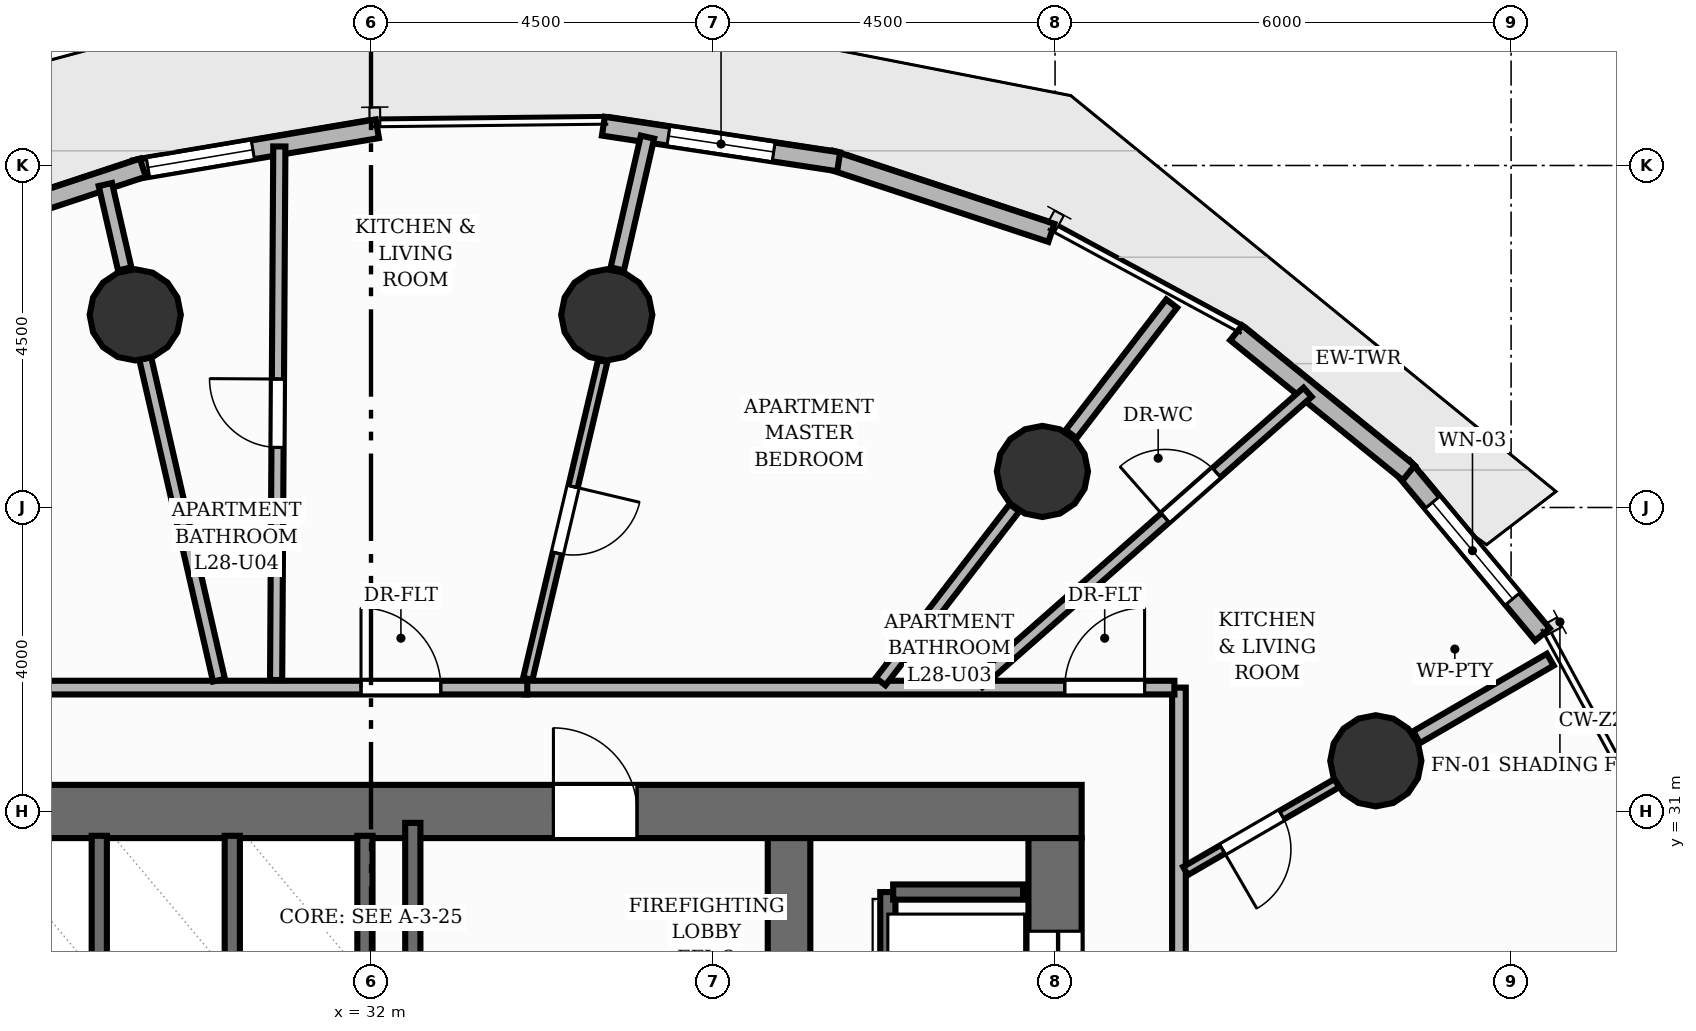
"""IFC4 building model, lengths in metres.
Left out: names, types, materials, properties, quantities, classifications, styles, units other than length and angle.
Written with IfcOpenShell. Run it as: python <this file> out.ifc"""

import sys

from ifc_helpers import new_model, si_unit, direction, frame, frame_2d, origin, origin_2d, place, context, subcontext, project, spatial, rectangle, circle, extrude, element, fill, save


model = new_model("IFC4")
c1 = context("Model", 3, precision=1e-05, world=origin(), true_north=direction((0.0, 1.0)))
c2 = subcontext(c1, "Body", "Model", "MODEL_VIEW")
j1 = project(units=[si_unit("LENGTHUNIT", "METRE"), si_unit("PLANEANGLEUNIT", "RADIAN")], contexts=[c1])
p1 = place(None, origin())
s1 = spatial("IfcSite", under=j1, at=p1, CompositionType="ELEMENT")
p2 = place(p1, origin())
s2 = spatial("IfcBuilding", under=s1, at=p2, CompositionType="ELEMENT")
p3 = place(p2, frame((0.0, 0.0, 96.48)))
s3 = spatial("IfcBuildingStorey", under=s2, at=p3, CompositionType="ELEMENT", Elevation=96.48)
p4 = place(p3, frame((22.65, 31.0, 0.0), z_axis=(0.0, 0.0, 1.0), x_axis=(1.0, 0.0, 0.0)))
e1 = element("IfcWall", 1, at=p4, inside=s3, PredefinedType="SHEAR", context=c2, shape_type="SweptSolid", body=[
    extrude(rectangle(XDim=18.7, YDim=0.7, at=frame_2d((9.35, 0.0))), origin(), (0.0, 0.0, 1.0), 3.2),
])
p5 = place(p4, frame((11.75, 0.0, 0.0)))
e2 = element("IfcOpeningElement", 2, at=p5, cuts=e1, PredefinedType="OPENING", context=c2, shape_type="SweptSolid", body=[
    extrude(rectangle(XDim=1.1, YDim=2.15, at=frame_2d((0.55, 1.075))), frame((0.0, 0.36, 0.0), z_axis=(0.0, -1.0, 0.0), x_axis=(1.0, 0.0, 0.0)), (0.0, 0.0, 1.0), 0.72),
])
p6 = place(p3, frame((41.0, 17.35, 0.0), z_axis=(0.0, 0.0, 1.0), x_axis=(0.0, 1.0, 0.0)))
e3 = element("IfcWall", 3, at=p6, inside=s3, PredefinedType="SHEAR", context=c2, shape_type="SweptSolid", body=[
    extrude(rectangle(XDim=13.3, YDim=0.7, at=frame_2d((6.65, 0.0))), origin(), (0.0, 0.0, 1.0), 3.2),
])
p7 = place(p6, frame((1.225, 0.0, 0.0)))
e4 = element("IfcOpeningElement", 4, at=p7, cuts=e3, PredefinedType="OPENING", context=c2, shape_type="SweptSolid", body=[
    extrude(rectangle(XDim=1.05, YDim=2.15, at=frame_2d((0.525, 1.075))), frame((0.0, 0.36, 0.0), z_axis=(0.0, -1.0, 0.0), x_axis=(1.0, 0.0, 0.0)), (0.0, 0.0, 1.0), 0.72),
])
p8 = place(p6, frame((4.475, 0.0, 0.0)))
e5 = element("IfcOpeningElement", 5, at=p8, cuts=e3, PredefinedType="OPENING", context=c2, shape_type="SweptSolid", body=[
    extrude(rectangle(XDim=1.05, YDim=2.15, at=frame_2d((0.525, 1.075))), frame((0.0, 0.36, 0.0), z_axis=(0.0, -1.0, 0.0), x_axis=(1.0, 0.0, 0.0)), (0.0, 0.0, 1.0), 0.72),
])
p9 = place(p6, frame((7.775, 0.0, 0.0)))
e6 = element("IfcOpeningElement", 6, at=p9, cuts=e3, PredefinedType="OPENING", context=c2, shape_type="SweptSolid", body=[
    extrude(rectangle(XDim=1.05, YDim=2.15, at=frame_2d((0.525, 1.075))), frame((0.0, 0.36, 0.0), z_axis=(0.0, -1.0, 0.0), x_axis=(1.0, 0.0, 0.0)), (0.0, 0.0, 1.0), 0.72),
])
p10 = place(p6, frame((11.025, 0.0, 0.0)))
e7 = element("IfcOpeningElement", 7, at=p10, cuts=e3, PredefinedType="OPENING", context=c2, shape_type="SweptSolid", body=[
    extrude(rectangle(XDim=1.05, YDim=2.15, at=frame_2d((0.525, 1.075))), frame((0.0, 0.36, 0.0), z_axis=(0.0, -1.0, 0.0), x_axis=(1.0, 0.0, 0.0)), (0.0, 0.0, 1.0), 0.72),
])
p11 = place(p3, frame((37.5, 17.35, 0.0), z_axis=(0.0, 0.0, 1.0), x_axis=(0.0, 1.0, 0.0)))
e8 = element("IfcWall", 8, at=p11, inside=s3, PredefinedType="SHEAR", context=c2, shape_type="SweptSolid", body=[
    extrude(rectangle(XDim=13.3, YDim=0.56, at=frame_2d((6.65, 0.0))), origin(), (0.0, 0.0, 1.0), 3.2),
])
for number, where, z_axis, x_axis in (
    (9, (45.22, 31.667, 0.0), (0.0, 0.0, 1.0), (1.0, 0.0, 0.0)),
    (10, (40.833, 35.474, 0.0), (0.0, 0.0, 1.0), (1.0, 0.0, 0.0)),
    (11, (35.102, 37.535, 0.0), (0.0, 0.0, 1.0), (1.0, 0.0, 0.0)),
    (12, (28.898, 37.535, 0.0), (0.0, 0.0, 1.0), (1.0, 0.0, 0.0)),
):
    element("IfcColumn", number, at=place(p3, frame(where, z_axis=z_axis, x_axis=x_axis)), inside=s3, PredefinedType="COLUMN", context=c2, shape_type="SweptSolid", body=[
        extrude(circle(Radius=0.6, at=origin_2d()), origin(), (0.0, 0.0, 1.0), 3.2),
    ])
p12 = place(p3, frame((45.572, 35.535, 0.0), z_axis=(0.0, 0.0, 1.0), x_axis=(0.640518566271, -0.76794268423, 0.0)))
e13 = element("IfcWall", 13, at=p12, inside=s3, PredefinedType="SOLIDWALL", context=c2, shape_type="SweptSolid", body=[
    extrude(rectangle(XDim=2.874, YDim=0.25, at=frame_2d((1.437, 0.0))), origin(), (0.0, 0.0, 1.0), 2.96),
])
p13 = place(p12, frame((0.612, 0.0, 0.85)))
e14 = element("IfcOpeningElement", 14, at=p13, cuts=e13, PredefinedType="OPENING", context=c2, shape_type="SweptSolid", body=[
    extrude(rectangle(XDim=1.65, YDim=1.55, at=frame_2d((0.825, 0.775))), frame((0.0, 0.135, 0.0), z_axis=(0.0, -1.0, 0.0), x_axis=(1.0, 0.0, 0.0)), (0.0, 0.0, 1.0), 0.27),
])
p14 = place(p3, frame((43.383, 37.298, 0.0), z_axis=(0.0, 0.0, 1.0), x_axis=(0.776285131062, -0.630381943976, 0.0)))
e15 = element("IfcWall", 15, at=p14, inside=s3, PredefinedType="SOLIDWALL", context=c2, shape_type="SweptSolid", body=[
    extrude(rectangle(XDim=2.923, YDim=0.25, at=frame_2d((1.462, 0.0))), origin(), (0.0, 0.0, 1.0), 2.96),
])
p15 = place(p3, frame((38.045, 39.574, 0.0), z_axis=(0.0, 0.0, 1.0), x_axis=(0.949533409058, -0.313665913166, 0.0)))
e16 = element("IfcWall", 16, at=p15, inside=s3, PredefinedType="SOLIDWALL", context=c2, shape_type="SweptSolid", body=[
    extrude(rectangle(XDim=3.061, YDim=0.25, at=frame_2d((1.53, 0.0))), origin(), (0.0, 0.0, 1.0), 2.96),
])
p16 = place(p3, frame((35.057, 40.017, 0.0), z_axis=(0.0, 0.0, 1.0), x_axis=(0.988719703222, -0.149777663425, 0.0)))
e17 = element("IfcWall", 17, at=p16, inside=s3, PredefinedType="SOLIDWALL", context=c2, shape_type="SweptSolid", body=[
    extrude(rectangle(XDim=3.131, YDim=0.25, at=frame_2d((1.566, 0.0))), origin(), (0.0, 0.0, 1.0), 2.96),
])
p17 = place(p16, frame((0.866, 0.0, 0.85)))
e18 = element("IfcOpeningElement", 18, at=p17, cuts=e17, PredefinedType="OPENING", context=c2, shape_type="SweptSolid", body=[
    extrude(rectangle(XDim=1.4, YDim=1.37, at=frame_2d((0.7, 0.685))), frame((0.0, 0.135, 0.0), z_axis=(0.0, -1.0, 0.0), x_axis=(1.0, 0.0, 0.0)), (0.0, 0.0, 1.0), 0.27),
])
p18 = place(p3, frame((28.893, 39.445, 0.0), z_axis=(0.0, 0.0, 1.0), x_axis=(0.986043062305, 0.166490478044, 0.0)))
e19 = element("IfcWall", 19, at=p18, inside=s3, PredefinedType="SOLIDWALL", context=c2, shape_type="SweptSolid", body=[
    extrude(rectangle(XDim=3.236, YDim=0.25, at=frame_2d((1.618, 0.0))), origin(), (0.0, 0.0, 1.0), 2.96),
])
p19 = place(p18, frame((0.175, 0.0, 0.85)))
e20 = element("IfcOpeningElement", 20, at=p19, cuts=e19, PredefinedType="OPENING", context=c2, shape_type="SweptSolid", body=[
    extrude(rectangle(XDim=1.4, YDim=1.55, at=frame_2d((0.7, 0.775))), frame((0.0, 0.135, 0.0), z_axis=(0.0, -1.0, 0.0), x_axis=(1.0, 0.0, 0.0)), (0.0, 0.0, 1.0), 0.27),
])
p20 = place(p3, frame((25.904, 38.445, 0.0), z_axis=(0.0, 0.0, 1.0), x_axis=(0.949206293356, 0.314654433709, 0.0)))
e21 = element("IfcWall", 21, at=p20, inside=s3, PredefinedType="SOLIDWALL", context=c2, shape_type="SweptSolid", body=[
    extrude(rectangle(XDim=3.26, YDim=0.25, at=frame_2d((1.63, 0.0))), origin(), (0.0, 0.0, 1.0), 2.96),
])
p21 = place(p3, frame((32.55, 27.35, 0.0), z_axis=(0.0, 0.0, 1.0), x_axis=(0.0, 1.0, 0.0)))
e22 = element("IfcWall", 22, at=p21, inside=s3, PredefinedType="SHEAR", context=c2, shape_type="SweptSolid", body=[
    extrude(rectangle(XDim=3.5, YDim=0.2, at=frame_2d((1.75, 0.0))), origin(), (0.0, 0.0, 1.0), 3.2),
])
p22 = place(p3, frame((38.8, 18.06, 0.0), z_axis=(0.0, 0.0, 1.0), x_axis=(0.0, 1.0, 0.0)))
e23 = element("IfcWall", 23, at=p22, inside=s3, PredefinedType="SHEAR", context=c2, shape_type="SweptSolid", body=[
    extrude(rectangle(XDim=11.88, YDim=0.2, at=frame_2d((5.94, 0.0))), origin(), (0.0, 0.0, 1.0), 3.2),
])
p23 = place(p3, frame((38.87, 29.94, 0.0), z_axis=(0.0, 0.0, 1.0), x_axis=(1.0, 0.0, 0.0)))
e24 = element("IfcWall", 24, at=p23, inside=s3, PredefinedType="SHEAR", context=c2, shape_type="SweptSolid", body=[
    extrude(rectangle(XDim=1.71, YDim=0.2, at=frame_2d((0.855, 0.0))), origin(), (0.0, 0.0, 1.0), 3.2),
])
for number, where, z_axis, x_axis in (
    (25, (31.92, 29.02, 0.0), (0.0, 0.0, 1.0), (0.0, 1.0, 0.0)),
    (26, (28.425, 29.02, 0.0), (0.0, 0.0, 1.0), (0.0, 1.0, 0.0)),
    (27, (30.175, 29.02, 0.0), (0.0, 0.0, 1.0), (0.0, 1.0, 0.0)),
):
    element("IfcWall", number, at=place(p3, frame(where, z_axis=z_axis, x_axis=x_axis)), inside=s3, PredefinedType="SHEAR", context=c2, shape_type="SweptSolid", body=[
        extrude(rectangle(XDim=1.66, YDim=0.2, at=frame_2d((0.83, 0.0))), origin(), (0.0, 0.0, 1.0), 3.2),
    ])
p24 = place(p3, frame((45.757, 31.978, 0.0), z_axis=(0.0, 0.0, 1.0), x_axis=(0.865025978628, 0.501727073516, 0.0)))
e28 = element("IfcWall", 28, at=p24, inside=s3, PredefinedType="PARTITIONING", context=c2, shape_type="SweptSolid", body=[
    extrude(rectangle(XDim=2.033, YDim=0.18, at=frame_2d((1.017, 0.0))), origin(), (0.0, 0.0, 1.0), 2.26),
])
p25 = place(p3, frame((41.212, 35.966, 0.0), z_axis=(0.0, 0.0, 1.0), x_axis=(0.610026423006, 0.792381071981, 0.0)))
e29 = element("IfcWall", 29, at=p25, inside=s3, PredefinedType="PARTITIONING", context=c2, shape_type="SweptSolid", body=[
    extrude(rectangle(XDim=2.167, YDim=0.18, at=frame_2d((1.084, 0.0))), origin(), (0.0, 0.0, 1.0), 2.26),
])
p26 = place(p3, frame((35.24, 38.139, 0.0), z_axis=(0.0, 0.0, 1.0), x_axis=(0.223406034992, 0.974725470853, 0.0)))
e30 = element("IfcWall", 30, at=p26, inside=s3, PredefinedType="PARTITIONING", context=c2, shape_type="SweptSolid", body=[
    extrude(rectangle(XDim=1.779, YDim=0.18, at=frame_2d((0.89, 0.0))), origin(), (0.0, 0.0, 1.0), 2.26),
])
p27 = place(p3, frame((28.76, 38.139, 0.0), z_axis=(0.0, 0.0, 1.0), x_axis=(-0.223325248633, 0.974743983476, 0.0)))
e31 = element("IfcWall", 31, at=p27, inside=s3, PredefinedType="PARTITIONING", context=c2, shape_type="SweptSolid", body=[
    extrude(rectangle(XDim=1.139, YDim=0.18, at=frame_2d((0.57, 0.0))), origin(), (0.0, 0.0, 1.0), 2.26),
])
p28 = place(p3, frame((42.63, 32.63, 0.0), z_axis=(0.0, 0.0, 1.0), x_axis=(0.0, -1.0, 0.0)))
e32 = element("IfcWall", 32, at=p28, inside=s3, PredefinedType="PARTITIONING", context=c2, shape_type="SweptSolid", body=[
    extrude(rectangle(XDim=6.23, YDim=0.18, at=frame_2d((3.115, 0.0))), origin(), (0.0, 0.0, 1.0), 2.955),
])
p29 = place(p3, frame((34.015, 32.63, 0.0), z_axis=(0.0, 0.0, 1.0), x_axis=(1.0, 0.0, 0.0)))
e33 = element("IfcWall", 33, at=p29, inside=s3, PredefinedType="PARTITIONING", context=c2, shape_type="SweptSolid", body=[
    extrude(rectangle(XDim=8.555, YDim=0.18, at=frame_2d((4.277, 0.0))), origin(), (0.0, 0.0, 1.0), 2.955),
])
p30 = place(p29, frame((7.112, 0.0, 0.0)))
e34 = element("IfcOpeningElement", 34, at=p30, cuts=e33, PredefinedType="OPENING", context=c2, shape_type="SweptSolid", body=[
    extrude(rectangle(XDim=1.05, YDim=2.15, at=frame_2d((0.525, 1.075))), frame((0.0, 0.1, 0.0), z_axis=(0.0, -1.0, 0.0), x_axis=(1.0, 0.0, 0.0)), (0.0, 0.0, 1.0), 0.2),
])
p31 = place(p3, frame((21.37, 32.63, 0.0), z_axis=(0.0, 0.0, 1.0), x_axis=(1.0, 0.0, 0.0)))
e35 = element("IfcWall", 35, at=p31, inside=s3, PredefinedType="PARTITIONING", context=c2, shape_type="SweptSolid", body=[
    extrude(rectangle(XDim=12.686, YDim=0.18, at=frame_2d((6.343, 0.0))), origin(), (0.0, 0.0, 1.0), 2.955),
])
p32 = place(p31, frame((10.499, 0.0, 0.0)))
e36 = element("IfcOpeningElement", 36, at=p32, cuts=e35, PredefinedType="OPENING", context=c2, shape_type="SweptSolid", body=[
    extrude(rectangle(XDim=1.05, YDim=2.15, at=frame_2d((0.525, 1.075))), frame((0.0, 0.1, 0.0), z_axis=(0.0, -1.0, 0.0), x_axis=(1.0, 0.0, 0.0)), (0.0, 0.0, 1.0), 0.2),
])
p33 = place(p31, frame((4.713, 0.0, 0.0)))
e37 = element("IfcOpeningElement", 37, at=p33, cuts=e35, PredefinedType="OPENING", context=c2, shape_type="SweptSolid", body=[
    extrude(rectangle(XDim=1.05, YDim=2.15, at=frame_2d((0.525, 1.075))), frame((0.0, 0.1, 0.0), z_axis=(0.0, -1.0, 0.0), x_axis=(1.0, 0.0, 0.0)), (0.0, 0.0, 1.0), 0.2),
])
p34 = place(p3, frame((39.991, 32.696, 0.0), z_axis=(0.0, 0.0, 1.0), x_axis=(0.750059872717, 0.661369932292, 0.0)))
e38 = element("IfcWall", 38, at=p34, inside=s3, PredefinedType="PLUMBINGWALL", context=c2, shape_type="SweptSolid", body=[
    extrude(rectangle(XDim=5.775, YDim=0.16, at=frame_2d((2.888, 0.0))), origin(), (0.0, 0.0, 1.0), 2.955),
])
p35 = place(p34, frame((3.278, 0.0, 0.0)))
e39 = element("IfcOpeningElement", 39, at=p35, cuts=e38, PredefinedType="OPENING", context=c2, shape_type="SweptSolid", body=[
    extrude(rectangle(XDim=0.9, YDim=2.1, at=frame_2d((0.45, 1.05))), frame((0.0, 0.09, 0.0), z_axis=(0.0, -1.0, 0.0), x_axis=(1.0, 0.0, 0.0)), (0.0, 0.0, 1.0), 0.18),
])
p36 = place(p3, frame((44.711, 31.375, 0.0), z_axis=(0.0, 0.0, 1.0), x_axis=(-0.864966854608, -0.501828995207, 0.0)))
e40 = element("IfcWall", 40, at=p36, inside=s3, PredefinedType="PARTITIONING", context=c2, shape_type="SweptSolid", body=[
    extrude(rectangle(XDim=2.306, YDim=0.125, at=frame_2d((1.153, 0.0))), origin(), (0.0, 0.0, 1.0), 2.26),
])
p37 = place(p36, frame((0.843, 0.0, 0.0)))
e41 = element("IfcOpeningElement", 41, at=p37, cuts=e40, PredefinedType="OPENING", context=c2, shape_type="SweptSolid", body=[
    extrude(rectangle(XDim=0.9, YDim=2.1, at=frame_2d((0.45, 1.05))), frame((0.0, 0.073, 0.0), z_axis=(0.0, -1.0, 0.0), x_axis=(1.0, 0.0, 0.0)), (0.0, 0.0, 1.0), 0.145),
])
p38 = place(p3, frame((38.705, 32.709, 0.0), z_axis=(0.0, 0.0, 1.0), x_axis=(0.610033601295, 0.792375545617, 0.0)))
e42 = element("IfcWall", 42, at=p38, inside=s3, PredefinedType="PLUMBINGWALL", context=c2, shape_type="SweptSolid", body=[
    extrude(rectangle(XDim=2.887, YDim=0.16, at=frame_2d((1.443, 0.0))), origin(), (0.0, 0.0, 1.0), 2.26),
])
p39 = place(p3, frame((30.752, 32.73, 0.0), z_axis=(0.0, 0.0, 1.0), x_axis=(0.006016026892, 0.999981903546, 0.0)))
e43 = element("IfcWall", 43, at=p39, inside=s3, PredefinedType="PLUMBINGWALL", context=c2, shape_type="SweptSolid", body=[
    extrude(rectangle(XDim=7.021, YDim=0.16, at=frame_2d((3.51, 0.0))), origin(), (0.0, 0.0, 1.0), 2.955),
])
p40 = place(p39, frame((3.06, 0.0, 0.0)))
e44 = element("IfcOpeningElement", 44, at=p40, cuts=e43, PredefinedType="OPENING", context=c2, shape_type="SweptSolid", body=[
    extrude(rectangle(XDim=0.9, YDim=2.1, at=frame_2d((0.45, 1.05))), frame((0.0, 0.09, 0.0), z_axis=(0.0, -1.0, 0.0), x_axis=(1.0, 0.0, 0.0)), (0.0, 0.0, 1.0), 0.18),
])
p41 = place(p3, frame((35.049, 36.927, 0.0), z_axis=(0.0, 0.0, 1.0), x_axis=(-0.229552612231, -0.973296254086, 0.0)))
e45 = element("IfcWall", 45, at=p41, inside=s3, PredefinedType="PARTITIONING", context=c2, shape_type="SweptSolid", body=[
    extrude(rectangle(XDim=4.295, YDim=0.125, at=frame_2d((2.147, 0.0))), origin(), (0.0, 0.0, 1.0), 2.26),
])
p42 = place(p41, frame((1.698, 0.0, 0.0)))
e46 = element("IfcOpeningElement", 46, at=p42, cuts=e45, PredefinedType="OPENING", context=c2, shape_type="SweptSolid", body=[
    extrude(rectangle(XDim=0.9, YDim=2.1, at=frame_2d((0.45, 1.05))), frame((0.0, 0.073, 0.0), z_axis=(0.0, -1.0, 0.0), x_axis=(1.0, 0.0, 0.0)), (0.0, 0.0, 1.0), 0.145),
])
p43 = place(p3, frame((30.0, 32.728, 0.0), z_axis=(0.0, 0.0, 1.0), x_axis=(-0.223409547543, 0.974724665773, 0.0)))
e47 = element("IfcWall", 47, at=p43, inside=s3, PredefinedType="PLUMBINGWALL", context=c2, shape_type="SweptSolid", body=[
    extrude(rectangle(XDim=4.342, YDim=0.16, at=frame_2d((2.171, 0.0))), origin(), (0.0, 0.0, 1.0), 2.26),
])
p44 = place(p13, origin())
e48 = element("IfcWindow", 48, at=p44, inside=s3, PartitioningType="SINGLE_PANEL", PredefinedType="WINDOW", context=c2, shape_type="SweptSolid", body=[
    extrude(rectangle(XDim=1.65, YDim=1.55, at=frame_2d((0.825, 0.775))), frame((0.0, 0.03, 0.0), z_axis=(0.0, -1.0, 0.0), x_axis=(1.0, 0.0, 0.0)), (0.0, 0.0, 1.0), 0.06),
])
fill(e14, e48)
p45 = place(p17, origin())
e49 = element("IfcWindow", 49, at=p45, inside=s3, PartitioningType="SINGLE_PANEL", PredefinedType="WINDOW", context=c2, shape_type="SweptSolid", body=[
    extrude(rectangle(XDim=1.4, YDim=1.37, at=frame_2d((0.7, 0.685))), frame((0.0, 0.03, 0.0), z_axis=(0.0, -1.0, 0.0), x_axis=(1.0, 0.0, 0.0)), (0.0, 0.0, 1.0), 0.06),
])
fill(e18, e49)
p46 = place(p19, origin())
e50 = element("IfcWindow", 50, at=p46, inside=s3, PartitioningType="SINGLE_PANEL", PredefinedType="WINDOW", context=c2, shape_type="SweptSolid", body=[
    extrude(rectangle(XDim=1.4, YDim=1.55, at=frame_2d((0.7, 0.775))), frame((0.0, 0.03, 0.0), z_axis=(0.0, -1.0, 0.0), x_axis=(1.0, 0.0, 0.0)), (0.0, 0.0, 1.0), 0.06),
])
fill(e20, e50)
p47 = place(p5, origin())
e51 = element("IfcDoor", 51, at=p47, inside=s3, OperationType="SINGLE_SWING_LEFT", PredefinedType="DOOR", context=c2, shape_type="SweptSolid", body=[
    extrude(rectangle(XDim=1.1, YDim=2.15, at=frame_2d((0.55, 1.075))), frame((0.0, 0.025, 0.0), z_axis=(0.0, -1.0, 0.0), x_axis=(1.0, 0.0, 0.0)), (0.0, 0.0, 1.0), 0.05),
])
fill(e2, e51)
p48 = place(p10, origin())
e52 = element("IfcDoor", 52, at=p48, inside=s3, OperationType="DOUBLE_DOOR_SLIDING", PredefinedType="DOOR", context=c2, shape_type="SweptSolid", body=[
    extrude(rectangle(XDim=1.05, YDim=2.15, at=frame_2d((0.525, 1.075))), frame((0.0, 0.025, 0.0), z_axis=(0.0, -1.0, 0.0), x_axis=(1.0, 0.0, 0.0)), (0.0, 0.0, 1.0), 0.05),
])
fill(e7, e52)
p49 = place(p30, origin())
e53 = element("IfcDoor", 53, at=p49, inside=s3, OperationType="SINGLE_SWING_RIGHT", PredefinedType="DOOR", context=c2, shape_type="SweptSolid", body=[
    extrude(rectangle(XDim=1.05, YDim=2.15, at=frame_2d((0.525, 1.075))), frame((0.0, 0.025, 0.0), z_axis=(0.0, -1.0, 0.0), x_axis=(1.0, 0.0, 0.0)), (0.0, 0.0, 1.0), 0.05),
])
fill(e34, e53)
p50 = place(p35, origin())
e54 = element("IfcDoor", 54, at=p50, inside=s3, OperationType="SINGLE_SWING_LEFT", PredefinedType="DOOR", context=c2, shape_type="SweptSolid", body=[
    extrude(rectangle(XDim=0.9, YDim=2.1, at=frame_2d((0.45, 1.05))), frame((0.0, 0.025, 0.0), z_axis=(0.0, -1.0, 0.0), x_axis=(1.0, 0.0, 0.0)), (0.0, 0.0, 1.0), 0.05),
])
fill(e39, e54)
p51 = place(p37, origin())
e55 = element("IfcDoor", 55, at=p51, inside=s3, OperationType="SINGLE_SWING_RIGHT", PredefinedType="DOOR", context=c2, shape_type="SweptSolid", body=[
    extrude(rectangle(XDim=0.9, YDim=2.1, at=frame_2d((0.45, 1.05))), frame((0.0, 0.025, 0.0), z_axis=(0.0, -1.0, 0.0), x_axis=(1.0, 0.0, 0.0)), (0.0, 0.0, 1.0), 0.05),
])
fill(e41, e55)
p52 = place(p32, origin())
e56 = element("IfcDoor", 56, at=p52, inside=s3, OperationType="SINGLE_SWING_LEFT", PredefinedType="DOOR", context=c2, shape_type="SweptSolid", body=[
    extrude(rectangle(XDim=1.05, YDim=2.15, at=frame_2d((0.525, 1.075))), frame((0.0, 0.025, 0.0), z_axis=(0.0, -1.0, 0.0), x_axis=(1.0, 0.0, 0.0)), (0.0, 0.0, 1.0), 0.05),
])
fill(e36, e56)
p53 = place(p40, origin())
e57 = element("IfcDoor", 57, at=p53, inside=s3, OperationType="SINGLE_SWING_RIGHT", PredefinedType="DOOR", context=c2, shape_type="SweptSolid", body=[
    extrude(rectangle(XDim=0.9, YDim=2.1, at=frame_2d((0.45, 1.05))), frame((0.0, 0.025, 0.0), z_axis=(0.0, -1.0, 0.0), x_axis=(1.0, 0.0, 0.0)), (0.0, 0.0, 1.0), 0.05),
])
fill(e44, e57)
p54 = place(p42, origin())
e58 = element("IfcDoor", 58, at=p54, inside=s3, OperationType="SINGLE_SWING_LEFT", PredefinedType="DOOR", context=c2, shape_type="SweptSolid", body=[
    extrude(rectangle(XDim=0.9, YDim=2.1, at=frame_2d((0.45, 1.05))), frame((0.0, 0.025, 0.0), z_axis=(0.0, -1.0, 0.0), x_axis=(1.0, 0.0, 0.0)), (0.0, 0.0, 1.0), 0.05),
])
fill(e46, e58)
save(model, sys.argv[1])
